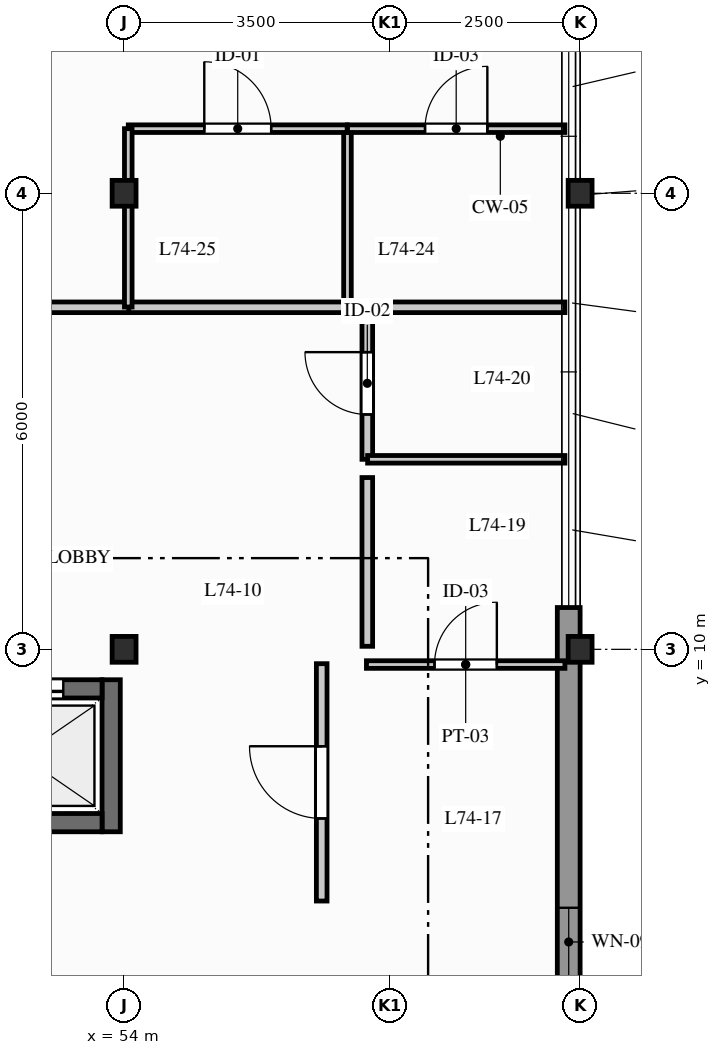
"""IFC4 building model, lengths in metres.
Left out: names, types, materials, properties, quantities, classifications, styles, units other than length and angle.
Written with IfcOpenShell. Run it as: python <this file> out.ifc"""

import sys

from ifc_helpers import new_model, si_unit, direction, frame, frame_2d, origin, origin_2d, place, context, subcontext, project, spatial, rectangle, i_section, extrude, element, fill, save


model = new_model("IFC4")
c1 = context("Model", 3, precision=1e-05, world=origin(), true_north=direction((0.0, 1.0)))
c2 = subcontext(c1, "Body", "Model", "MODEL_VIEW")
j1 = project(units=[si_unit("LENGTHUNIT", "METRE"), si_unit("PLANEANGLEUNIT", "RADIAN")], contexts=[c1])
p1 = place(None, origin())
s1 = spatial("IfcSite", under=j1, at=p1, CompositionType="ELEMENT")
p2 = place(p1, origin())
s2 = spatial("IfcBuilding", under=s1, at=p2, CompositionType="ELEMENT")
p3 = place(p2, frame((0.0, 0.0, 243.65)))
s3 = spatial("IfcBuildingStorey", under=s2, at=p3, CompositionType="ELEMENT", Elevation=243.65)
for number, where, z_axis, x_axis in (
    (1, (54.0, 10.0, 0.0), (0.0, 0.0, 1.0), (1.0, 0.0, 0.0)),
    (2, (54.0, 16.0, 0.0), (0.0, 0.0, 1.0), (1.0, 0.0, 0.0)),
    (3, (60.0, 10.0, 0.0), (0.0, 0.0, 1.0), (1.0, 0.0, 0.0)),
    (4, (60.0, 16.0, 0.0), (0.0, 0.0, 1.0), (1.0, 0.0, 0.0)),
):
    element("IfcColumn", number, at=place(p3, frame(where, z_axis=z_axis, x_axis=x_axis)), inside=s3, PredefinedType="COLUMN", context=c2, shape_type="SweptSolid", body=[
        extrude(i_section(OverallWidth=0.314, OverallDepth=0.34, WebThickness=0.019, FlangeThickness=0.031, FilletRadius=0.015, at=origin_2d()), origin(), (0.0, 0.0, 1.0), 3.6),
    ])
p4 = place(p3, frame((59.85, 2.5, 0.0), z_axis=(0.0, 0.0, 1.0), x_axis=(0.0, 1.0, 0.0)))
e5 = element("IfcWall", 5, at=p4, inside=s3, PredefinedType="STANDARD", context=c2, shape_type="SweptSolid", body=[
    extrude(rectangle(XDim=8.05, YDim=0.3, at=frame_2d((4.025, 0.0))), origin(), (0.0, 0.0, 1.0), 3.34),
])
p5 = place(p4, frame((3.2, 0.0, 1.2)))
e6 = element("IfcOpeningElement", 6, at=p5, cuts=e5, PredefinedType="OPENING", context=c2, shape_type="SweptSolid", body=[
    extrude(rectangle(XDim=0.9, YDim=0.9, at=frame_2d((0.45, 0.45))), frame((0.0, 0.16, 0.0), z_axis=(0.0, -1.0, 0.0), x_axis=(1.0, 0.0, 0.0)), (0.0, 0.0, 1.0), 0.32),
])
p6 = place(p3, frame((53.83, 7.6, 0.0), z_axis=(0.0, 0.0, 1.0), x_axis=(0.0, 1.0, 0.0)))
e7 = element("IfcWall", 7, at=p6, inside=s3, PredefinedType="SHEAR", context=c2, shape_type="SweptSolid", body=[
    extrude(rectangle(XDim=2.0, YDim=0.24, at=frame_2d((1.0, 0.0))), origin(), (0.0, 0.0, 1.0), 3.34),
])
p7 = place(p3, frame((51.59, 7.72, 0.0), z_axis=(0.0, 0.0, 1.0), x_axis=(1.0, 0.0, 0.0)))
e8 = element("IfcWall", 8, at=p7, inside=s3, PredefinedType="SHEAR", context=c2, shape_type="SweptSolid", body=[
    extrude(rectangle(XDim=2.12, YDim=0.24, at=frame_2d((1.06, 0.0))), origin(), (0.0, 0.0, 1.0), 3.34),
])
p8 = place(p3, frame((51.59, 9.48, 0.0), z_axis=(0.0, 0.0, 1.0), x_axis=(1.0, 0.0, 0.0)))
e9 = element("IfcWall", 9, at=p8, inside=s3, PredefinedType="SHEAR", context=c2, shape_type="SweptSolid", body=[
    extrude(rectangle(XDim=2.12, YDim=0.24, at=frame_2d((1.06, 0.0))), origin(), (0.0, 0.0, 1.0), 3.34),
])
p9 = place(p8, frame((0.51, 0.0, 0.0)))
e10 = element("IfcOpeningElement", 10, at=p9, cuts=e9, PredefinedType="OPENING", context=c2, shape_type="SweptSolid", body=[
    extrude(rectangle(XDim=1.1, YDim=2.06, at=frame_2d((0.55, 1.03))), frame((0.0, 0.13, 0.0), z_axis=(0.0, -1.0, 0.0), x_axis=(1.0, 0.0, 0.0)), (0.0, 0.0, 1.0), 0.26),
])
p10 = place(p3, frame((56.6, 6.689, 0.0), z_axis=(0.0, 0.0, 1.0), x_axis=(0.0, 1.0, 0.0)))
e11 = element("IfcWall", 11, at=p10, inside=s3, PredefinedType="PARTITIONING", context=c2, shape_type="SweptSolid", body=[
    extrude(rectangle(XDim=3.123, YDim=0.14, at=frame_2d((1.561, 0.0))), origin(), (0.0, 0.0, 1.0), 3.34),
])
p11 = place(p10, frame((1.086, 0.0, 0.0)))
e12 = element("IfcOpeningElement", 12, at=p11, cuts=e11, PredefinedType="OPENING", context=c2, shape_type="SweptSolid", body=[
    extrude(rectangle(XDim=0.95, YDim=2.05, at=frame_2d((0.475, 1.025))), frame((0.0, 0.08, 0.0), z_axis=(0.0, -1.0, 0.0), x_axis=(1.0, 0.0, 0.0)), (0.0, 0.0, 1.0), 0.16),
])
p12 = place(p3, frame((57.189, 9.8, 0.0), z_axis=(0.0, 0.0, 1.0), x_axis=(1.0, 0.0, 0.0)))
e13 = element("IfcWall", 13, at=p12, inside=s3, PredefinedType="PARTITIONING", context=c2, shape_type="SweptSolid", body=[
    extrude(rectangle(XDim=2.611, YDim=0.1, at=frame_2d((1.306, 0.0))), origin(), (0.0, 0.0, 1.0), 2.703),
])
p13 = place(p12, frame((0.896, 0.0, 0.0)))
e14 = element("IfcOpeningElement", 14, at=p13, cuts=e13, PredefinedType="OPENING", context=c2, shape_type="SweptSolid", body=[
    extrude(rectangle(XDim=0.82, YDim=2.02, at=frame_2d((0.41, 1.01))), frame((0.0, 0.06, 0.0), z_axis=(0.0, -1.0, 0.0), x_axis=(1.0, 0.0, 0.0)), (0.0, 0.0, 1.0), 0.12),
])
p14 = place(p3, frame((57.2, 12.5, 0.0), z_axis=(0.0, 0.0, 1.0), x_axis=(0.0, 1.0, 0.0)))
e15 = element("IfcWall", 15, at=p14, inside=s3, PredefinedType="PARTITIONING", context=c2, shape_type="SweptSolid", body=[
    extrude(rectangle(XDim=2.0, YDim=0.14, at=frame_2d((1.0, 0.0))), origin(), (0.0, 0.0, 1.0), 3.34),
])
p15 = place(p14, frame((0.59, 0.0, 0.0)))
e16 = element("IfcOpeningElement", 16, at=p15, cuts=e15, PredefinedType="OPENING", context=c2, shape_type="SweptSolid", body=[
    extrude(rectangle(XDim=0.82, YDim=2.02, at=frame_2d((0.41, 1.01))), frame((0.0, 0.08, 0.0), z_axis=(0.0, -1.0, 0.0), x_axis=(1.0, 0.0, 0.0)), (0.0, 0.0, 1.0), 0.16),
])
p16 = place(p3, frame((54.044, 14.5, 0.0), z_axis=(0.0, 0.0, 1.0), x_axis=(1.0, 0.0, 0.0)))
e17 = element("IfcWall", 17, at=p16, inside=s3, PredefinedType="PARTITIONING", context=c2, shape_type="SweptSolid", body=[
    extrude(rectangle(XDim=2.903, YDim=0.14, at=frame_2d((1.451, 0.0))), origin(), (0.0, 0.0, 1.0), 2.703),
])
p17 = place(p3, frame((49.493, 14.5, 0.0), z_axis=(0.0, 0.0, 1.0), x_axis=(1.0, 0.0, 0.0)))
e18 = element("IfcWall", 18, at=p17, inside=s3, PredefinedType="PARTITIONING", context=c2, shape_type="SweptSolid", body=[
    extrude(rectangle(XDim=4.57, YDim=0.14, at=frame_2d((2.285, 0.0))), origin(), (0.0, 0.0, 1.0), 2.703),
])
p18 = place(p17, frame((1.81, 0.0, 0.0)))
e19 = element("IfcOpeningElement", 19, at=p18, cuts=e18, PredefinedType="OPENING", context=c2, shape_type="SweptSolid", body=[
    extrude(rectangle(XDim=0.95, YDim=2.05, at=frame_2d((0.475, 1.025))), frame((0.0, 0.08, 0.0), z_axis=(0.0, -1.0, 0.0), x_axis=(1.0, 0.0, 0.0)), (0.0, 0.0, 1.0), 0.16),
])
p19 = place(p3, frame((57.204, 12.5, 0.0), z_axis=(0.0, 0.0, 1.0), x_axis=(1.0, 0.0, 0.0)))
e20 = element("IfcWall", 20, at=p19, inside=s3, PredefinedType="PARTITIONING", context=c2, shape_type="SweptSolid", body=[
    extrude(rectangle(XDim=2.596, YDim=0.1, at=frame_2d((1.298, 0.0))), origin(), (0.0, 0.0, 1.0), 3.34),
])
p20 = place(p3, frame((57.204, 14.5, 0.0), z_axis=(0.0, 0.0, 1.0), x_axis=(1.0, 0.0, 0.0)))
e21 = element("IfcWall", 21, at=p20, inside=s3, PredefinedType="PARTITIONING", context=c2, shape_type="SweptSolid", body=[
    extrude(rectangle(XDim=2.596, YDim=0.14, at=frame_2d((1.298, 0.0))), origin(), (0.0, 0.0, 1.0), 3.34),
])
p21 = place(p3, frame((56.939, 14.504, 0.0), z_axis=(0.0, 0.0, 1.0), x_axis=(0.0, 1.0, 0.0)))
e22 = element("IfcWall", 22, at=p21, inside=s3, PredefinedType="PARTITIONING", context=c2, shape_type="SweptSolid", body=[
    extrude(rectangle(XDim=2.346, YDim=0.1, at=frame_2d((1.173, 0.0))), origin(), (0.0, 0.0, 1.0), 2.703),
])
p22 = place(p3, frame((56.939, 16.85, 0.0), z_axis=(0.0, 0.0, 1.0), x_axis=(1.0, 0.0, 0.0)))
e23 = element("IfcWall", 23, at=p22, inside=s3, PredefinedType="PARTITIONING", context=c2, shape_type="SweptSolid", body=[
    extrude(rectangle(XDim=2.861, YDim=0.1, at=frame_2d((1.431, 0.0))), origin(), (0.0, 0.0, 1.0), 3.34),
])
p23 = place(p22, frame((1.021, 0.0, 0.0)))
e24 = element("IfcOpeningElement", 24, at=p23, cuts=e23, PredefinedType="OPENING", context=c2, shape_type="SweptSolid", body=[
    extrude(rectangle(XDim=0.82, YDim=2.02, at=frame_2d((0.41, 1.01))), frame((0.0, 0.06, 0.0), z_axis=(0.0, -1.0, 0.0), x_axis=(1.0, 0.0, 0.0)), (0.0, 0.0, 1.0), 0.12),
])
p24 = place(p3, frame((54.055, 16.85, 0.0), z_axis=(0.0, 0.0, 1.0), x_axis=(1.0, 0.0, 0.0)))
e25 = element("IfcWall", 25, at=p24, inside=s3, PredefinedType="PARTITIONING", context=c2, shape_type="SweptSolid", body=[
    extrude(rectangle(XDim=2.88, YDim=0.1, at=frame_2d((1.44, 0.0))), origin(), (0.0, 0.0, 1.0), 2.703),
])
p25 = place(p24, frame((1.0, 0.0, 0.0)))
e26 = element("IfcOpeningElement", 26, at=p25, cuts=e25, PredefinedType="OPENING", context=c2, shape_type="SweptSolid", body=[
    extrude(rectangle(XDim=0.88, YDim=2.04, at=frame_2d((0.44, 1.02))), frame((0.0, 0.06, 0.0), z_axis=(0.0, -1.0, 0.0), x_axis=(1.0, 0.0, 0.0)), (0.0, 0.0, 1.0), 0.12),
])
p26 = place(p3, frame((54.055, 14.504, 0.0), z_axis=(0.0, 0.0, 1.0), x_axis=(0.0, 1.0, 0.0)))
e27 = element("IfcWall", 27, at=p26, inside=s3, PredefinedType="PARTITIONING", context=c2, shape_type="SweptSolid", body=[
    extrude(rectangle(XDim=2.346, YDim=0.1, at=frame_2d((1.173, 0.0))), origin(), (0.0, 0.0, 1.0), 2.703),
])
p27 = place(p3, frame((57.2, 10.04, 0.0), z_axis=(0.0, 0.0, 1.0), x_axis=(0.0, 1.0, 0.0)))
e28 = element("IfcWall", 28, at=p27, inside=s3, PredefinedType="PARTITIONING", context=c2, shape_type="SweptSolid", body=[
    extrude(rectangle(XDim=2.22, YDim=0.14, at=frame_2d((1.11, 0.0))), origin(), (0.0, 0.0, 1.0), 2.703),
])
p28 = place(p5, origin())
e29 = element("IfcWindow", 29, at=p28, inside=s3, PartitioningType="SINGLE_PANEL", PredefinedType="WINDOW", context=c2, shape_type="SweptSolid", body=[
    extrude(rectangle(XDim=0.9, YDim=0.9, at=frame_2d((0.45, 0.45))), frame((0.0, 0.03, 0.0), z_axis=(0.0, -1.0, 0.0), x_axis=(1.0, 0.0, 0.0)), (0.0, 0.0, 1.0), 0.06),
])
fill(e6, e29)
p29 = place(p9, origin())
e30 = element("IfcDoor", 30, at=p29, inside=s3, OperationType="SLIDING_TO_RIGHT", PredefinedType="DOOR", context=c2, shape_type="SweptSolid", body=[
    extrude(rectangle(XDim=1.1, YDim=2.06, at=frame_2d((0.55, 1.03))), frame((0.0, 0.025, 0.0), z_axis=(0.0, -1.0, 0.0), x_axis=(1.0, 0.0, 0.0)), (0.0, 0.0, 1.0), 0.05),
])
fill(e10, e30)
p30 = place(p11, origin())
e31 = element("IfcDoor", 31, at=p30, inside=s3, OperationType="SINGLE_SWING_RIGHT", PredefinedType="DOOR", context=c2, shape_type="SweptSolid", body=[
    extrude(rectangle(XDim=0.95, YDim=2.05, at=frame_2d((0.475, 1.025))), frame((0.0, 0.025, 0.0), z_axis=(0.0, -1.0, 0.0), x_axis=(1.0, 0.0, 0.0)), (0.0, 0.0, 1.0), 0.05),
])
fill(e12, e31)
p31 = place(p15, origin())
e32 = element("IfcDoor", 32, at=p31, inside=s3, OperationType="SINGLE_SWING_RIGHT", PredefinedType="DOOR", context=c2, shape_type="SweptSolid", body=[
    extrude(rectangle(XDim=0.82, YDim=2.02, at=frame_2d((0.41, 1.01))), frame((0.0, 0.025, 0.0), z_axis=(0.0, -1.0, 0.0), x_axis=(1.0, 0.0, 0.0)), (0.0, 0.0, 1.0), 0.05),
])
fill(e16, e32)
p32 = place(p23, origin())
e33 = element("IfcDoor", 33, at=p32, inside=s3, OperationType="SINGLE_SWING_RIGHT", PredefinedType="DOOR", context=c2, shape_type="SweptSolid", body=[
    extrude(rectangle(XDim=0.82, YDim=2.02, at=frame_2d((0.41, 1.01))), frame((0.0, 0.025, 0.0), z_axis=(0.0, -1.0, 0.0), x_axis=(1.0, 0.0, 0.0)), (0.0, 0.0, 1.0), 0.05),
])
fill(e24, e33)
p33 = place(p25, origin())
e34 = element("IfcDoor", 34, at=p33, inside=s3, OperationType="SINGLE_SWING_LEFT", PredefinedType="DOOR", context=c2, shape_type="SweptSolid", body=[
    extrude(rectangle(XDim=0.88, YDim=2.04, at=frame_2d((0.44, 1.02))), frame((0.0, 0.025, 0.0), z_axis=(0.0, -1.0, 0.0), x_axis=(1.0, 0.0, 0.0)), (0.0, 0.0, 1.0), 0.05),
])
fill(e26, e34)
p34 = place(p13, origin())
e35 = element("IfcDoor", 35, at=p34, inside=s3, OperationType="SINGLE_SWING_RIGHT", PredefinedType="DOOR", context=c2, shape_type="SweptSolid", body=[
    extrude(rectangle(XDim=0.82, YDim=2.02, at=frame_2d((0.41, 1.01))), frame((0.0, 0.025, 0.0), z_axis=(0.0, -1.0, 0.0), x_axis=(1.0, 0.0, 0.0)), (0.0, 0.0, 1.0), 0.05),
])
fill(e14, e35)
save(model, sys.argv[1])
